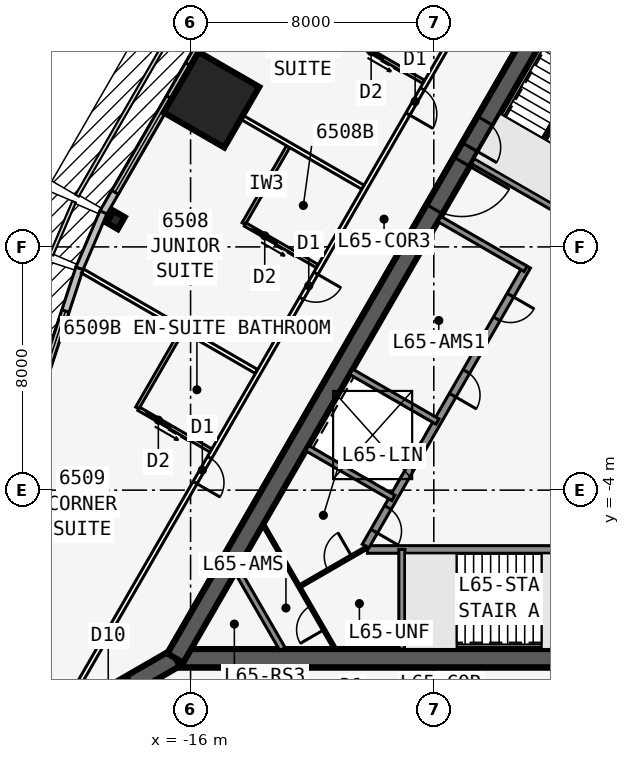
"""IFC4 building model, lengths in metres.
Left out: names, types, materials, properties, quantities, classifications, styles, units other than length and angle.
Written with IfcOpenShell. Run it as: python <this file> out.ifc"""

import sys

from ifc_helpers import new_model, si_unit, direction, frame, frame_2d, origin, origin_2d, place, context, subcontext, project, spatial, rectangle, i_section, extrude, element, fill, save


model = new_model("IFC4")
c1 = context("Model", 3, precision=1e-05, world=origin(), true_north=direction((0.0, 1.0)))
c2 = subcontext(c1, "Body", "Model", "MODEL_VIEW")
j1 = project(units=[si_unit("LENGTHUNIT", "METRE"), si_unit("PLANEANGLEUNIT", "RADIAN")], contexts=[c1])
p1 = place(None, origin())
s1 = spatial("IfcSite", under=j1, at=p1, CompositionType="ELEMENT")
p2 = place(p1, origin())
s2 = spatial("IfcBuilding", under=s1, at=p2, CompositionType="ELEMENT")
p3 = place(p2, frame((0.0, 0.0, 246.5)))
s3 = spatial("IfcBuildingStorey", under=s2, at=p3, CompositionType="ELEMENT", Elevation=246.5)
p4 = place(p3, frame((-16.5, -9.526, 0.0), z_axis=(0.0, 0.0, 1.0), x_axis=(1.0, 0.0, 0.0)))
e1 = element("IfcWall", 1, at=p4, inside=s3, PredefinedType="SHEAR", context=c2, shape_type="SweptSolid", body=[
    extrude(rectangle(XDim=33.0, YDim=0.6, at=frame_2d((16.5, 0.0))), origin(), (0.0, 0.0, 1.0), 3.6),
])
p5 = place(p4, frame((14.05, 0.0, 0.0)))
e2 = element("IfcOpeningElement", 2, at=p5, cuts=e1, PredefinedType="OPENING", context=c2, shape_type="SweptSolid", body=[
    extrude(rectangle(XDim=1.8, YDim=2.13, at=frame_2d((0.9, 1.065))), frame((0.0, 0.31, 0.0), z_axis=(0.0, -1.0, 0.0), x_axis=(1.0, 0.0, 0.0)), (0.0, 0.0, 1.0), 0.62),
])
p6 = place(p3, frame((-10.183, -5.951, 0.0), z_axis=(0.0, 0.0, 1.0), x_axis=(1.0, 0.0, 0.0)))
e3 = element("IfcWall", 3, at=p6, inside=s3, PredefinedType="SOLIDWALL", context=c2, shape_type="SweptSolid", body=[
    extrude(rectangle(XDim=7.633, YDim=0.25, at=frame_2d((3.816, 0.0))), origin(), (0.0, 0.0, 1.0), 3.435),
])
p7 = place(p3, frame((-9.05, -5.951, 0.0), z_axis=(0.0, 0.0, 1.0), x_axis=(0.0, -1.0, 0.0)))
e4 = element("IfcWall", 4, at=p7, inside=s3, PredefinedType="SOLIDWALL", context=c2, shape_type="SweptSolid", body=[
    extrude(rectangle(XDim=3.275, YDim=0.2, at=frame_2d((1.637, 0.0))), origin(), (0.0, 0.0, 1.0), 3.435),
])
p8 = place(p3, frame((0.0, 19.052, 0.0), z_axis=(0.0, 0.0, 1.0), x_axis=(-0.499999749417, -0.866025548458, 0.0)))
e5 = element("IfcWall", 5, at=p8, inside=s3, PredefinedType="SHEAR", context=c2, shape_type="SweptSolid", body=[
    extrude(rectangle(XDim=33.0, YDim=0.6, at=frame_2d((16.5, 0.0))), origin(), (0.0, 0.0, 1.0), 3.6),
])
p9 = place(p8, frame((14.15, 0.0, 0.0)))
e6 = element("IfcOpeningElement", 6, at=p9, cuts=e5, PredefinedType="OPENING", context=c2, shape_type="SweptSolid", body=[
    extrude(rectangle(XDim=1.8, YDim=2.13, at=frame_2d((0.9, 1.065))), frame((0.0, 0.31, 0.0), z_axis=(0.0, -1.0, 0.0), x_axis=(1.0, 0.0, 0.0)), (0.0, 0.0, 1.0), 0.62),
])
p10 = place(p8, frame((12.6, 0.0, 0.0)))
e7 = element("IfcOpeningElement", 7, at=p10, cuts=e5, PredefinedType="OPENING", context=c2, shape_type="SweptSolid", body=[
    extrude(rectangle(XDim=1.0, YDim=2.13, at=frame_2d((0.5, 1.065))), frame((0.0, 0.31, 0.0), z_axis=(0.0, -1.0, 0.0), x_axis=(1.0, 0.0, 0.0)), (0.0, 0.0, 1.0), 0.62),
])
p11 = place(p3, frame((-4.929, 3.365, 0.0), z_axis=(0.0, 0.0, 1.0), x_axis=(-0.499991433582, -0.866030349552, 0.0)))
e8 = element("IfcWall", 8, at=p11, inside=s3, PredefinedType="SOLIDWALL", context=c2, shape_type="SweptSolid", body=[
    extrude(rectangle(XDim=10.633, YDim=0.25, at=frame_2d((5.316, 0.0))), origin(), (0.0, 0.0, 1.0), 3.435),
])
p12 = place(p11, frame((9.164, 0.0, 0.0)))
e9 = element("IfcOpeningElement", 9, at=p12, cuts=e8, PredefinedType="OPENING", context=c2, shape_type="SweptSolid", body=[
    extrude(rectangle(XDim=0.9, YDim=2.13, at=frame_2d((0.45, 1.065))), frame((0.0, 0.135, 0.0), z_axis=(0.0, -1.0, 0.0), x_axis=(1.0, 0.0, 0.0)), (0.0, 0.0, 1.0), 0.27),
])
p13 = place(p11, frame((1.1, 0.0, 0.0)))
e10 = element("IfcOpeningElement", 10, at=p13, cuts=e8, PredefinedType="OPENING", context=c2, shape_type="SweptSolid", body=[
    extrude(rectangle(XDim=0.9, YDim=2.13, at=frame_2d((0.45, 1.065))), frame((0.0, 0.135, 0.0), z_axis=(0.0, -1.0, 0.0), x_axis=(1.0, 0.0, 0.0)), (0.0, 0.0, 1.0), 0.27),
])
p14 = place(p11, frame((4.0, 0.0, 0.0)))
e11 = element("IfcOpeningElement", 11, at=p14, cuts=e8, PredefinedType="OPENING", context=c2, shape_type="SweptSolid", body=[
    extrude(rectangle(XDim=0.9, YDim=2.13, at=frame_2d((0.45, 1.065))), frame((0.0, 0.135, 0.0), z_axis=(0.0, -1.0, 0.0), x_axis=(1.0, 0.0, 0.0)), (0.0, 0.0, 1.0), 0.27),
])
for number, where, z_axis, x_axis in (
    (12, (-3.879, 5.184, 0.0), (0.0, 0.0, 1.0), (-0.866, 0.5, 0.0)),
    (13, (-4.979, 3.279, 0.0), (0.0, 0.0, 1.0), (-0.866, 0.5, 0.0)),
    (14, (-7.879, -1.744, 0.0), (0.0, 0.0, 1.0), (-0.866, 0.5, 0.0)),
    (15, (-9.329, -4.256, 0.0), (0.0, 0.0, 1.0), (-0.866, 0.5, 0.0)),
):
    element("IfcWall", number, at=place(p3, frame(where, z_axis=z_axis, x_axis=x_axis)), inside=s3, PredefinedType="SOLIDWALL", context=c2, shape_type="SweptSolid", body=[
        extrude(rectangle(XDim=3.275, YDim=0.2, at=frame_2d((1.637, 0.0))), origin(), (0.0, 0.0, 1.0), 3.435),
    ])
p15 = place(p3, frame((-16.5, -9.526, 0.0), z_axis=(0.0, 0.0, 1.0), x_axis=(-0.866031398331, -0.499989616998, 0.0)))
e16 = element("IfcWall", 16, at=p15, inside=s3, PredefinedType="SHEAR", context=c2, shape_type="SweptSolid", body=[
    extrude(rectangle(XDim=4.746, YDim=0.6, at=frame_2d((2.373, 0.0))), origin(), (0.0, 0.0, 1.0), 3.6),
])
p16 = place(p15, frame((1.65, 0.0, 0.0)))
e17 = element("IfcOpeningElement", 17, at=p16, cuts=e16, PredefinedType="OPENING", context=c2, shape_type="SweptSolid", body=[
    extrude(rectangle(XDim=1.8, YDim=2.13, at=frame_2d((0.9, 1.065))), frame((0.0, 0.31, 0.0), z_axis=(0.0, -1.0, 0.0), x_axis=(1.0, 0.0, 0.0)), (0.0, 0.0, 1.0), 0.62),
])
p17 = place(p3, frame((-18.461, 4.885, 0.0), z_axis=(0.0, 0.0, 1.0), x_axis=(-0.866025403784, 0.5, 0.0)))
e18 = element("IfcColumn", 18, at=p17, inside=s3, PredefinedType="COLUMN", context=c2, shape_type="SweptSolid", body=[
    extrude(i_section(OverallWidth=0.419, OverallDepth=0.455, WebThickness=0.042, FlangeThickness=0.068, at=origin_2d()), origin(), (0.0, 0.0, 1.0), 3.6),
])
p18 = place(p3, frame((-15.312, 8.84, 0.0), z_axis=(0.0, 0.0, 1.0), x_axis=(-0.866025403784, 0.5, 0.0)))
e19 = element("IfcColumn", 19, at=p18, inside=s3, PredefinedType="COLUMN", context=c2, shape_type="SweptSolid", body=[
    extrude(rectangle(XDim=2.3, YDim=2.3, at=origin_2d()), origin(), (0.0, 0.0, 1.0), 3.6),
])
p19 = place(p3, frame((-13.873, 13.783, 0.0), z_axis=(0.0, 0.0, 1.0), x_axis=(-0.499993662806, -0.866029062534, 0.0)))
e20 = element("IfcWall", 20, at=p19, inside=s3, PredefinedType="STANDARD", context=c2, shape_type="SweptSolid", body=[
    extrude(rectangle(XDim=10.0, YDim=0.25, at=frame_2d((5.0, 0.0))), origin(), (0.0, 0.0, 1.0), 3.435),
])
p20 = place(p19, frame((0.775, 0.0, 0.45)))
e21 = element("IfcOpeningElement", 21, at=p20, cuts=e20, PredefinedType="OPENING", context=c2, shape_type="SweptSolid", body=[
    extrude(rectangle(XDim=3.6, YDim=2.6, at=frame_2d((1.8, 1.3))), frame((0.0, 0.135, 0.0), z_axis=(0.0, -1.0, 0.0), x_axis=(1.0, 0.0, 0.0)), (0.0, 0.0, 1.0), 0.27),
])
p21 = place(p19, frame((5.625, 0.0, 0.45)))
e22 = element("IfcOpeningElement", 22, at=p21, cuts=e20, PredefinedType="OPENING", context=c2, shape_type="SweptSolid", body=[
    extrude(rectangle(XDim=3.6, YDim=2.6, at=frame_2d((1.8, 1.3))), frame((0.0, 0.135, 0.0), z_axis=(0.0, -1.0, 0.0), x_axis=(1.0, 0.0, 0.0)), (0.0, 0.0, 1.0), 0.27),
])
p22 = place(p3, frame((-18.866, 5.136, 0.0), z_axis=(0.0, 0.0, 1.0), x_axis=(-0.393290226175, -0.91941437774, 0.0)))
e23 = element("IfcWall", 23, at=p22, inside=s3, PredefinedType="STANDARD", context=c2, shape_type="SweptSolid", body=[
    extrude(rectangle(XDim=2.014, YDim=0.25, at=frame_2d((1.007, 0.0))), origin(), (0.0, 0.0, 1.0), 3.435),
])
p23 = place(p3, frame((-19.654, 3.294, 0.0), z_axis=(0.0, 0.0, 1.0), x_axis=(-0.311328857048, -0.95030223759, 0.0)))
e24 = element("IfcWall", 24, at=p23, inside=s3, PredefinedType="STANDARD", context=c2, shape_type="SweptSolid", body=[
    extrude(rectangle(XDim=7.153, YDim=0.25, at=frame_2d((3.576, 0.0))), origin(), (0.0, 0.0, 1.0), 3.435),
])
p24 = place(p23, frame((1.476, 0.0, 0.45)))
e25 = element("IfcOpeningElement", 25, at=p24, cuts=e24, PredefinedType="OPENING", context=c2, shape_type="SweptSolid", body=[
    extrude(rectangle(XDim=4.2, YDim=2.6, at=frame_2d((2.1, 1.3))), frame((0.0, 0.135, 0.0), z_axis=(0.0, -1.0, 0.0), x_axis=(1.0, 0.0, 0.0)), (0.0, 0.0, 1.0), 0.27),
])
p25 = place(p3, frame((-0.35, 23.096, 0.0), z_axis=(0.0, 0.0, 1.0), x_axis=(-0.499998875317, -0.866026053119, 0.0)))
e26 = element("IfcWall", 26, at=p25, inside=s3, PredefinedType="PARTITIONING", context=c2, shape_type="SweptSolid", body=[
    extrude(rectangle(XDim=39.654, YDim=0.15, at=frame_2d((19.827, 0.0))), origin(), (0.0, 0.0, 1.0), 3.435),
])
p26 = place(p25, frame((8.652, 0.0, 0.0)))
e27 = element("IfcOpeningElement", 27, at=p26, cuts=e26, PredefinedType="OPENING", context=c2, shape_type="SweptSolid", body=[
    extrude(rectangle(XDim=0.95, YDim=2.13, at=frame_2d((0.475, 1.065))), frame((0.0, 0.085, 0.0), z_axis=(0.0, -1.0, 0.0), x_axis=(1.0, 0.0, 0.0)), (0.0, 0.0, 1.0), 0.17),
])
p27 = place(p25, frame((16.052, 0.0, 0.0)))
e28 = element("IfcOpeningElement", 28, at=p27, cuts=e26, PredefinedType="OPENING", context=c2, shape_type="SweptSolid", body=[
    extrude(rectangle(XDim=0.95, YDim=2.13, at=frame_2d((0.475, 1.065))), frame((0.0, 0.085, 0.0), z_axis=(0.0, -1.0, 0.0), x_axis=(1.0, 0.0, 0.0)), (0.0, 0.0, 1.0), 0.17),
])
p28 = place(p25, frame((23.052, 0.0, 0.0)))
e29 = element("IfcOpeningElement", 29, at=p28, cuts=e26, PredefinedType="OPENING", context=c2, shape_type="SweptSolid", body=[
    extrude(rectangle(XDim=0.95, YDim=2.13, at=frame_2d((0.475, 1.065))), frame((0.0, 0.085, 0.0), z_axis=(0.0, -1.0, 0.0), x_axis=(1.0, 0.0, 0.0)), (0.0, 0.0, 1.0), 0.17),
])
p29 = place(p25, frame((30.052, 0.0, 0.0)))
e30 = element("IfcOpeningElement", 30, at=p29, cuts=e26, PredefinedType="OPENING", context=c2, shape_type="SweptSolid", body=[
    extrude(rectangle(XDim=0.95, YDim=2.13, at=frame_2d((0.475, 1.065))), frame((0.0, 0.085, 0.0), z_axis=(0.0, -1.0, 0.0), x_axis=(1.0, 0.0, 0.0)), (0.0, 0.0, 1.0), 0.17),
])
p30 = place(p3, frame((-10.329, 5.963, 0.0), z_axis=(0.0, 0.0, 1.0), x_axis=(-0.866011785882, 0.500023586156, 0.0)))
e31 = element("IfcWall", 31, at=p30, inside=s3, PredefinedType="PARTITIONING", context=c2, shape_type="SweptSolid", body=[
    extrude(rectangle(XDim=6.854, YDim=0.15, at=frame_2d((3.427, 0.0))), origin(), (0.0, 0.0, 1.0), 2.678),
])
p31 = place(p3, frame((-13.829, -0.099, 0.0), z_axis=(0.0, 0.0, 1.0), x_axis=(-0.866022562216, 0.500004921708, 0.0)))
e32 = element("IfcWall", 32, at=p31, inside=s3, PredefinedType="PARTITIONING", context=c2, shape_type="SweptSolid", body=[
    extrude(rectangle(XDim=6.609, YDim=0.15, at=frame_2d((3.304, 0.0))), origin(), (0.0, 0.0, 1.0), 2.678),
])
p32 = place(p3, frame((-8.329, 9.427, 0.0), z_axis=(0.0, 0.0, 1.0), x_axis=(-0.866035715982, 0.499982138324, 0.0)))
e33 = element("IfcWall", 33, at=p32, inside=s3, PredefinedType="PLUMBINGWALL", context=c2, shape_type="SweptSolid", body=[
    extrude(rectangle(XDim=2.74, YDim=0.12, at=frame_2d((1.37, 0.0))), origin(), (0.0, 0.0, 1.0), 3.435),
])
p33 = place(p32, frame((1.55, 0.0, 0.0)))
e34 = element("IfcOpeningElement", 34, at=p33, cuts=e33, PredefinedType="OPENING", context=c2, shape_type="SweptSolid", body=[
    extrude(rectangle(XDim=0.9, YDim=2.13, at=frame_2d((0.45, 1.065))), frame((0.0, 0.07, 0.0), z_axis=(0.0, -1.0, 0.0), x_axis=(1.0, 0.0, 0.0)), (0.0, 0.0, 1.0), 0.14),
])
p34 = place(p3, frame((-12.753, 7.363, 0.0), z_axis=(0.0, 0.0, 1.0), x_axis=(-0.50002537861, -0.866010750942, 0.0)))
e35 = element("IfcWall", 35, at=p34, inside=s3, PredefinedType="PLUMBINGWALL", context=c2, shape_type="SweptSolid", body=[
    extrude(rectangle(XDim=3.0, YDim=0.12, at=frame_2d((1.5, 0.0))), origin(), (0.0, 0.0, 1.0), 3.435),
])
p35 = place(p3, frame((-11.829, 3.365, 0.0), z_axis=(0.0, 0.0, 1.0), x_axis=(-0.865997131366, 0.500048966069, 0.0)))
e36 = element("IfcWall", 36, at=p35, inside=s3, PredefinedType="PLUMBINGWALL", context=c2, shape_type="SweptSolid", body=[
    extrude(rectangle(XDim=2.74, YDim=0.12, at=frame_2d((1.37, 0.0))), origin(), (0.0, 0.0, 1.0), 3.435),
])
p36 = place(p35, frame((1.55, 0.0, 0.0)))
e37 = element("IfcOpeningElement", 37, at=p36, cuts=e36, PredefinedType="OPENING", context=c2, shape_type="SweptSolid", body=[
    extrude(rectangle(XDim=0.9, YDim=2.13, at=frame_2d((0.45, 1.065))), frame((0.0, 0.07, 0.0), z_axis=(0.0, -1.0, 0.0), x_axis=(1.0, 0.0, 0.0)), (0.0, 0.0, 1.0), 0.14),
])
p37 = place(p3, frame((-16.253, 1.301, 0.0), z_axis=(0.0, 0.0, 1.0), x_axis=(-0.499990139034, -0.866031096941, 0.0)))
e38 = element("IfcWall", 38, at=p37, inside=s3, PredefinedType="PLUMBINGWALL", context=c2, shape_type="SweptSolid", body=[
    extrude(rectangle(XDim=3.0, YDim=0.12, at=frame_2d((1.5, 0.0))), origin(), (0.0, 0.0, 1.0), 3.435),
])
p38 = place(p3, frame((-15.329, -2.697, 0.0), z_axis=(0.0, 0.0, 1.0), x_axis=(-0.866035715982, 0.499982138324, 0.0)))
e39 = element("IfcWall", 39, at=p38, inside=s3, PredefinedType="PLUMBINGWALL", context=c2, shape_type="SweptSolid", body=[
    extrude(rectangle(XDim=2.74, YDim=0.12, at=frame_2d((1.37, 0.0))), origin(), (0.0, 0.0, 1.0), 3.435),
])
p39 = place(p38, frame((1.55, 0.0, 0.0)))
e40 = element("IfcOpeningElement", 40, at=p39, cuts=e39, PredefinedType="OPENING", context=c2, shape_type="SweptSolid", body=[
    extrude(rectangle(XDim=0.9, YDim=2.13, at=frame_2d((0.45, 1.065))), frame((0.0, 0.07, 0.0), z_axis=(0.0, -1.0, 0.0), x_axis=(1.0, 0.0, 0.0)), (0.0, 0.0, 1.0), 0.14),
])
p40 = place(p3, frame((-12.978, -9.226, 0.0), z_axis=(0.0, 0.0, 1.0), x_axis=(-0.499952404951, 0.866052881055, 0.0)))
e41 = element("IfcWall", 41, at=p40, inside=s3, PredefinedType="SOLIDWALL", context=c2, shape_type="SweptSolid", body=[
    extrude(rectangle(XDim=3.002, YDim=0.2, at=frame_2d((1.501, 0.0))), origin(), (0.0, 0.0, 1.0), 3.435),
])
p41 = place(p3, frame((-11.246, -9.226, 0.0), z_axis=(0.0, 0.0, 1.0), x_axis=(-0.499999210213, 0.866025859768, 0.0)))
e42 = element("IfcWall", 42, at=p41, inside=s3, PredefinedType="PARTITIONING", context=c2, shape_type="SweptSolid", body=[
    extrude(rectangle(XDim=4.734, YDim=0.1, at=frame_2d((2.367, 0.0))), origin(), (0.0, 0.0, 1.0), 3.435),
])
p42 = place(p41, frame((0.734, 0.0, 0.0)))
e43 = element("IfcOpeningElement", 43, at=p42, cuts=e42, PredefinedType="OPENING", context=c2, shape_type="SweptSolid", body=[
    extrude(rectangle(XDim=0.9, YDim=2.13, at=frame_2d((0.45, 1.065))), frame((0.0, 0.06, 0.0), z_axis=(0.0, -1.0, 0.0), x_axis=(1.0, 0.0, 0.0)), (0.0, 0.0, 1.0), 0.12),
])
p43 = place(p3, frame((-12.43, -7.176, 0.0), z_axis=(0.0, 0.0, 1.0), x_axis=(0.866029291668, 0.499993265928, 0.0)))
e44 = element("IfcWall", 44, at=p43, inside=s3, PredefinedType="PARTITIONING", context=c2, shape_type="SweptSolid", body=[
    extrude(rectangle(XDim=2.575, YDim=0.1, at=frame_2d((1.288, 0.0))), origin(), (0.0, 0.0, 1.0), 3.435),
])
p44 = place(p43, frame((1.095, 0.0, 0.0)))
e45 = element("IfcOpeningElement", 45, at=p44, cuts=e44, PredefinedType="OPENING", context=c2, shape_type="SweptSolid", body=[
    extrude(rectangle(XDim=0.9, YDim=2.13, at=frame_2d((0.45, 1.065))), frame((0.0, 0.06, 0.0), z_axis=(0.0, -1.0, 0.0), x_axis=(1.0, 0.0, 0.0)), (0.0, 0.0, 1.0), 0.12),
])
p45 = place(p3, frame((-7.247, -7.576, 0.0), z_axis=(0.0, 0.0, 1.0), x_axis=(1.0, 0.0, 0.0)))
e46 = element("IfcWall", 46, at=p45, inside=s3, PredefinedType="SOLIDWALL", context=c2, shape_type="SweptSolid", body=[
    extrude(rectangle(XDim=2.794, YDim=0.1, at=frame_2d((1.397, 0.0))), origin(), (0.0, 0.0, 1.0), 3.6),
])
p46 = place(p3, frame((-2.988, 9.978, 0.0), z_axis=(0.0, 0.0, 1.0), x_axis=(-0.499992232847, -0.866029888106, 0.0)))
e47 = element("IfcWall", 47, at=p46, inside=s3, PredefinedType="SOLIDWALL", context=c2, shape_type="SweptSolid", body=[
    extrude(rectangle(XDim=2.794, YDim=0.1, at=frame_2d((1.397, 0.0))), origin(), (0.0, 0.0, 1.0), 3.6),
])
p47 = place(p20, origin())
e48 = element("IfcWindow", 48, at=p47, inside=s3, PartitioningType="SINGLE_PANEL", PredefinedType="WINDOW", context=c2, shape_type="SweptSolid", body=[
    extrude(rectangle(XDim=3.6, YDim=2.6, at=frame_2d((1.8, 1.3))), frame((0.0, 0.03, 0.0), z_axis=(0.0, -1.0, 0.0), x_axis=(1.0, 0.0, 0.0)), (0.0, 0.0, 1.0), 0.06),
])
fill(e21, e48)
p48 = place(p21, origin())
e49 = element("IfcWindow", 49, at=p48, inside=s3, PartitioningType="SINGLE_PANEL", PredefinedType="WINDOW", context=c2, shape_type="SweptSolid", body=[
    extrude(rectangle(XDim=3.6, YDim=2.6, at=frame_2d((1.8, 1.3))), frame((0.0, 0.03, 0.0), z_axis=(0.0, -1.0, 0.0), x_axis=(1.0, 0.0, 0.0)), (0.0, 0.0, 1.0), 0.06),
])
fill(e22, e49)
p49 = place(p24, origin())
e50 = element("IfcWindow", 50, at=p49, inside=s3, PartitioningType="SINGLE_PANEL", PredefinedType="WINDOW", context=c2, shape_type="SweptSolid", body=[
    extrude(rectangle(XDim=4.2, YDim=2.6, at=frame_2d((2.1, 1.3))), frame((0.0, 0.03, 0.0), z_axis=(0.0, -1.0, 0.0), x_axis=(1.0, 0.0, 0.0)), (0.0, 0.0, 1.0), 0.06),
])
fill(e25, e50)
p50 = place(p33, origin())
e51 = element("IfcDoor", 51, at=p50, inside=s3, OperationType="SLIDING_TO_LEFT", PredefinedType="DOOR", context=c2, shape_type="SweptSolid", body=[
    extrude(rectangle(XDim=0.9, YDim=2.13, at=frame_2d((0.45, 1.065))), frame((0.0, 0.025, 0.0), z_axis=(0.0, -1.0, 0.0), x_axis=(1.0, 0.0, 0.0)), (0.0, 0.0, 1.0), 0.05),
])
fill(e34, e51)
p51 = place(p27, origin())
e52 = element("IfcDoor", 52, at=p51, inside=s3, OperationType="SINGLE_SWING_RIGHT", PredefinedType="DOOR", context=c2, shape_type="SweptSolid", body=[
    extrude(rectangle(XDim=0.95, YDim=2.13, at=frame_2d((0.475, 1.065))), frame((0.0, 0.025, 0.0), z_axis=(0.0, -1.0, 0.0), x_axis=(1.0, 0.0, 0.0)), (0.0, 0.0, 1.0), 0.05),
])
fill(e28, e52)
p52 = place(p36, origin())
e53 = element("IfcDoor", 53, at=p52, inside=s3, OperationType="SLIDING_TO_LEFT", PredefinedType="DOOR", context=c2, shape_type="SweptSolid", body=[
    extrude(rectangle(XDim=0.9, YDim=2.13, at=frame_2d((0.45, 1.065))), frame((0.0, 0.025, 0.0), z_axis=(0.0, -1.0, 0.0), x_axis=(1.0, 0.0, 0.0)), (0.0, 0.0, 1.0), 0.05),
])
fill(e37, e53)
p53 = place(p28, origin())
e54 = element("IfcDoor", 54, at=p53, inside=s3, OperationType="SINGLE_SWING_LEFT", PredefinedType="DOOR", context=c2, shape_type="SweptSolid", body=[
    extrude(rectangle(XDim=0.95, YDim=2.13, at=frame_2d((0.475, 1.065))), frame((0.0, 0.025, 0.0), z_axis=(0.0, -1.0, 0.0), x_axis=(1.0, 0.0, 0.0)), (0.0, 0.0, 1.0), 0.05),
])
fill(e29, e54)
p54 = place(p39, origin())
e55 = element("IfcDoor", 55, at=p54, inside=s3, OperationType="SLIDING_TO_LEFT", PredefinedType="DOOR", context=c2, shape_type="SweptSolid", body=[
    extrude(rectangle(XDim=0.9, YDim=2.13, at=frame_2d((0.45, 1.065))), frame((0.0, 0.025, 0.0), z_axis=(0.0, -1.0, 0.0), x_axis=(1.0, 0.0, 0.0)), (0.0, 0.0, 1.0), 0.05),
])
fill(e40, e55)
p55 = place(p29, origin())
e56 = element("IfcDoor", 56, at=p55, inside=s3, OperationType="SINGLE_SWING_RIGHT", PredefinedType="DOOR", context=c2, shape_type="SweptSolid", body=[
    extrude(rectangle(XDim=0.95, YDim=2.13, at=frame_2d((0.475, 1.065))), frame((0.0, 0.025, 0.0), z_axis=(0.0, -1.0, 0.0), x_axis=(1.0, 0.0, 0.0)), (0.0, 0.0, 1.0), 0.05),
])
fill(e30, e56)
p56 = place(p9, origin())
e57 = element("IfcDoor", 57, at=p56, inside=s3, OperationType="DOUBLE_DOOR_SINGLE_SWING", PredefinedType="DOOR", context=c2, shape_type="SweptSolid", body=[
    extrude(rectangle(XDim=1.8, YDim=2.13, at=frame_2d((0.9, 1.065))), frame((0.0, 0.025, 0.0), z_axis=(0.0, -1.0, 0.0), x_axis=(1.0, 0.0, 0.0)), (0.0, 0.0, 1.0), 0.05),
])
fill(e6, e57)
p57 = place(p10, origin())
e58 = element("IfcDoor", 58, at=p57, inside=s3, OperationType="SINGLE_SWING_RIGHT", PredefinedType="DOOR", context=c2, shape_type="SweptSolid", body=[
    extrude(rectangle(XDim=1.0, YDim=2.13, at=frame_2d((0.5, 1.065))), frame((0.0, 0.025, 0.0), z_axis=(0.0, -1.0, 0.0), x_axis=(1.0, 0.0, 0.0)), (0.0, 0.0, 1.0), 0.05),
])
fill(e7, e58)
p58 = place(p42, origin())
e59 = element("IfcDoor", 59, at=p58, inside=s3, OperationType="SINGLE_SWING_LEFT", PredefinedType="DOOR", context=c2, shape_type="SweptSolid", body=[
    extrude(rectangle(XDim=0.9, YDim=2.13, at=frame_2d((0.45, 1.065))), frame((0.0, 0.025, 0.0), z_axis=(0.0, -1.0, 0.0), x_axis=(1.0, 0.0, 0.0)), (0.0, 0.0, 1.0), 0.05),
])
fill(e43, e59)
p59 = place(p12, origin())
e60 = element("IfcDoor", 60, at=p59, inside=s3, OperationType="SINGLE_SWING_RIGHT", PredefinedType="DOOR", context=c2, shape_type="SweptSolid", body=[
    extrude(rectangle(XDim=0.9, YDim=2.13, at=frame_2d((0.45, 1.065))), frame((0.0, 0.025, 0.0), z_axis=(0.0, -1.0, 0.0), x_axis=(1.0, 0.0, 0.0)), (0.0, 0.0, 1.0), 0.05),
])
fill(e9, e60)
p60 = place(p44, origin())
e61 = element("IfcDoor", 61, at=p60, inside=s3, OperationType="SINGLE_SWING_RIGHT", PredefinedType="DOOR", context=c2, shape_type="SweptSolid", body=[
    extrude(rectangle(XDim=0.9, YDim=2.13, at=frame_2d((0.45, 1.065))), frame((0.0, 0.025, 0.0), z_axis=(0.0, -1.0, 0.0), x_axis=(1.0, 0.0, 0.0)), (0.0, 0.0, 1.0), 0.05),
])
fill(e45, e61)
p61 = place(p13, origin())
e62 = element("IfcDoor", 62, at=p61, inside=s3, OperationType="SINGLE_SWING_LEFT", PredefinedType="DOOR", context=c2, shape_type="SweptSolid", body=[
    extrude(rectangle(XDim=0.9, YDim=2.13, at=frame_2d((0.45, 1.065))), frame((0.0, 0.025, 0.0), z_axis=(0.0, -1.0, 0.0), x_axis=(1.0, 0.0, 0.0)), (0.0, 0.0, 1.0), 0.05),
])
fill(e10, e62)
p62 = place(p14, origin())
e63 = element("IfcDoor", 63, at=p62, inside=s3, OperationType="SINGLE_SWING_RIGHT", PredefinedType="DOOR", context=c2, shape_type="SweptSolid", body=[
    extrude(rectangle(XDim=0.9, YDim=2.13, at=frame_2d((0.45, 1.065))), frame((0.0, 0.025, 0.0), z_axis=(0.0, -1.0, 0.0), x_axis=(1.0, 0.0, 0.0)), (0.0, 0.0, 1.0), 0.05),
])
fill(e11, e63)
save(model, sys.argv[1])
